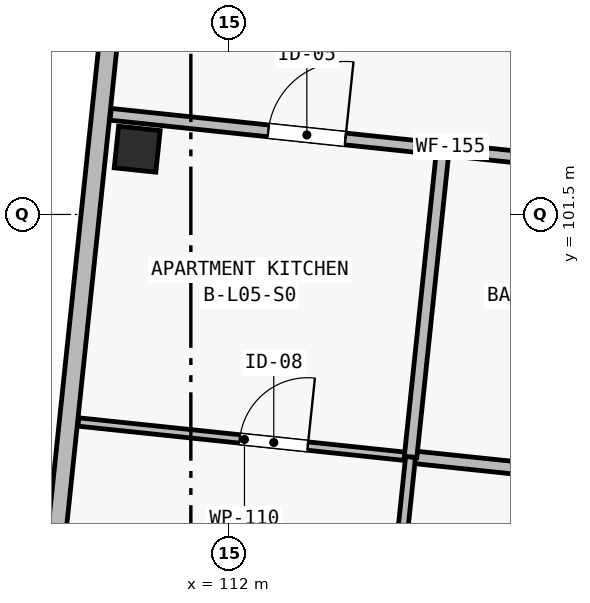
"""IFC4 building model, lengths in metres.
Left out: names, types, materials, properties, quantities, classifications, styles, units other than length and angle.
Written with IfcOpenShell. Run it as: python <this file> out.ifc"""

import sys

from ifc_helpers import new_model, si_unit, direction, frame, frame_2d, origin, origin_2d, place, context, subcontext, project, spatial, rectangle, extrude, element, fill, save


model = new_model("IFC4")
c1 = context("Model", 3, precision=1e-05, world=origin(), true_north=direction((0.0, 1.0)))
c2 = subcontext(c1, "Body", "Model", "MODEL_VIEW")
j1 = project(units=[si_unit("LENGTHUNIT", "METRE"), si_unit("PLANEANGLEUNIT", "RADIAN")], contexts=[c1])
p1 = place(None, origin())
s1 = spatial("IfcSite", under=j1, at=p1, CompositionType="ELEMENT")
p2 = place(p1, origin())
s2 = spatial("IfcBuilding", under=s1, at=p2, CompositionType="ELEMENT")
p3 = place(p2, frame((0.0, 0.0, 18.15)))
s3 = spatial("IfcBuildingStorey", under=s2, at=p3, CompositionType="ELEMENT", Elevation=18.15)
p4 = place(p3, frame((110.794, 102.358, 0.0), z_axis=(0.0, 0.0, 1.0), x_axis=(0.994521895368, -0.104528463268, 0.0)))
e1 = element("IfcColumn", 1, at=p4, inside=s3, PredefinedType="COLUMN", context=c2, shape_type="SweptSolid", body=[
    extrude(rectangle(XDim=0.55, YDim=0.55, at=origin_2d()), origin(), (0.0, 0.0, 1.0), 3.25),
])
p5 = place(p3, frame((109.423, 94.333, 0.0), z_axis=(0.0, 0.0, 1.0), x_axis=(0.1045253859, 0.994522218808, 0.0)))
e2 = element("IfcWall", 2, at=p5, inside=s3, PredefinedType="SOLIDWALL", context=c2, shape_type="SweptSolid", body=[
    extrude(rectangle(XDim=20.65, YDim=0.24, at=frame_2d((10.325, 0.0))), origin(), (0.0, 0.0, 1.0), 3.0),
])
p6 = place(p5, frame((17.06, 0.0, 0.45)))
e3 = element("IfcOpeningElement", 3, at=p6, cuts=e2, PredefinedType="OPENING", context=c2, shape_type="SweptSolid", body=[
    extrude(rectangle(XDim=0.6, YDim=2.22, at=frame_2d((0.3, 1.11))), frame((0.0, 0.135, 0.0), z_axis=(0.0, -1.0, 0.0), x_axis=(1.0, 0.0, 0.0)), (0.0, 0.0, 1.0), 0.27),
])
p7 = place(p3, frame((110.446, 102.817, 0.0), z_axis=(0.0, 0.0, 1.0), x_axis=(0.994522594842, -0.104521808006, 0.0)))
e4 = element("IfcWall", 4, at=p7, inside=s3, PredefinedType="PARTITIONING", context=c2, shape_type="SweptSolid", body=[
    extrude(rectangle(XDim=8.11, YDim=0.155, at=frame_2d((4.055, 0.0))), origin(), (0.0, 0.0, 1.0), 2.97),
])
p8 = place(p7, frame((2.085, 0.0, 0.0)))
e5 = element("IfcOpeningElement", 5, at=p8, cuts=e4, PredefinedType="OPENING", context=c2, shape_type="SweptSolid", body=[
    extrude(rectangle(XDim=1.02, YDim=2.2, at=frame_2d((0.51, 1.1))), frame((0.0, 0.093, 0.0), z_axis=(0.0, -1.0, 0.0), x_axis=(1.0, 0.0, 0.0)), (0.0, 0.0, 1.0), 0.185),
])
p9 = place(p3, frame((110.02, 98.77, 0.0), z_axis=(0.0, 0.0, 1.0), x_axis=(0.994525828039, -0.104491039633, 0.0)))
e6 = element("IfcWall", 6, at=p9, inside=s3, PredefinedType="PARTITIONING", context=c2, shape_type="SweptSolid", body=[
    extrude(rectangle(XDim=4.395, YDim=0.11, at=frame_2d((2.198, 0.0))), origin(), (0.0, 0.0, 1.0), 2.97),
])
p10 = place(p9, frame((2.135, 0.0, 0.0)))
e7 = element("IfcOpeningElement", 7, at=p10, cuts=e6, PredefinedType="OPENING", context=c2, shape_type="SweptSolid", body=[
    extrude(rectangle(XDim=0.9, YDim=2.1, at=frame_2d((0.45, 1.05))), frame((0.0, 0.07, 0.0), z_axis=(0.0, -1.0, 0.0), x_axis=(1.0, 0.0, 0.0)), (0.0, 0.0, 1.0), 0.14),
])
p11 = place(p3, frame((114.391, 98.31, 0.0), z_axis=(0.0, 0.0, 1.0), x_axis=(0.994517841934, -0.104567021925, 0.0)))
e8 = element("IfcWall", 8, at=p11, inside=s3, PredefinedType="PLUMBINGWALL", context=c2, shape_type="SweptSolid", body=[
    extrude(rectangle(XDim=3.885, YDim=0.165, at=frame_2d((1.942, 0.0))), origin(), (0.0, 0.0, 1.0), 2.97),
])
p12 = place(p11, frame((1.4, 0.0, 0.0)))
e9 = element("IfcOpeningElement", 9, at=p12, cuts=e8, PredefinedType="OPENING", context=c2, shape_type="SweptSolid", body=[
    extrude(rectangle(XDim=0.82, YDim=2.08, at=frame_2d((0.41, 1.04))), frame((0.0, 0.097, 0.0), z_axis=(0.0, -1.0, 0.0), x_axis=(1.0, 0.0, 0.0)), (0.0, 0.0, 1.0), 0.195),
])
p13 = place(p3, frame((113.937, 93.994, 0.0), z_axis=(0.0, 0.0, 1.0), x_axis=(0.104520797474, 0.994522701046, 0.0)))
e10 = element("IfcWall", 10, at=p13, inside=s3, PredefinedType="PARTITIONING", context=c2, shape_type="SweptSolid", body=[
    extrude(rectangle(XDim=4.34, YDim=0.13, at=frame_2d((2.17, 0.0))), origin(), (0.0, 0.0, 1.0), 2.97),
])
p14 = place(p13, frame((1.35, 0.0, 0.0)))
e11 = element("IfcOpeningElement", 11, at=p14, cuts=e10, PredefinedType="OPENING", context=c2, shape_type="SweptSolid", body=[
    extrude(rectangle(XDim=0.88, YDim=2.1, at=frame_2d((0.44, 1.05))), frame((0.0, 0.08, 0.0), z_axis=(0.0, -1.0, 0.0), x_axis=(1.0, 0.0, 0.0)), (0.0, 0.0, 1.0), 0.16),
])
p15 = place(p3, frame((114.391, 98.31, 0.0), z_axis=(0.0, 0.0, 1.0), x_axis=(0.104556757316, 0.994518921137, 0.0)))
e12 = element("IfcWall", 12, at=p15, inside=s3, PredefinedType="PLUMBINGWALL", context=c2, shape_type="SweptSolid", body=[
    extrude(rectangle(XDim=4.07, YDim=0.165, at=frame_2d((2.035, 0.0))), origin(), (0.0, 0.0, 1.0), 2.97),
])
p16 = place(p8, origin())
e13 = element("IfcDoor", 13, at=p16, inside=s3, OperationType="SINGLE_SWING_RIGHT", PredefinedType="DOOR", context=c2, shape_type="SweptSolid", body=[
    extrude(rectangle(XDim=1.02, YDim=2.2, at=frame_2d((0.51, 1.1))), frame((0.0, 0.025, 0.0), z_axis=(0.0, -1.0, 0.0), x_axis=(1.0, 0.0, 0.0)), (0.0, 0.0, 1.0), 0.05),
])
fill(e5, e13)
p17 = place(p10, origin())
e14 = element("IfcDoor", 14, at=p17, inside=s3, OperationType="SINGLE_SWING_RIGHT", PredefinedType="DOOR", context=c2, shape_type="SweptSolid", body=[
    extrude(rectangle(XDim=0.9, YDim=2.1, at=frame_2d((0.45, 1.05))), frame((0.0, 0.025, 0.0), z_axis=(0.0, -1.0, 0.0), x_axis=(1.0, 0.0, 0.0)), (0.0, 0.0, 1.0), 0.05),
])
fill(e7, e14)
save(model, sys.argv[1])
